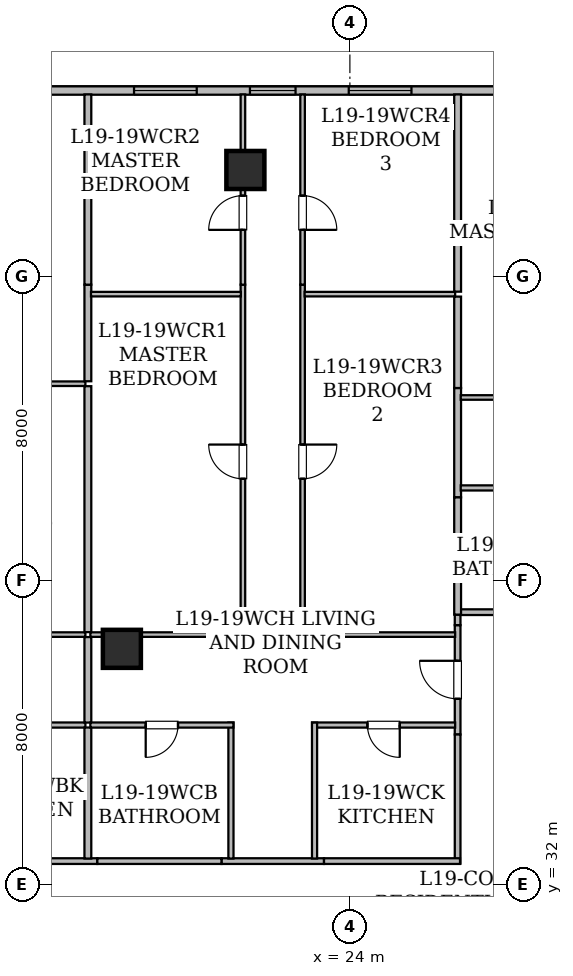
"""IFC4 building model, lengths in metres.
Left out: names, types, materials, properties, quantities, classifications, styles, units other than length and angle.
Written with IfcOpenShell. Run it as: python <this file> out.ifc"""

import sys

from ifc_helpers import new_model, si_unit, direction, frame, frame_2d, origin, origin_2d, place, context, subcontext, project, spatial, rectangle, hollow_rectangle, extrude, element, fill, save


model = new_model("IFC4")
c1 = context("Model", 3, precision=1e-05, world=origin(), true_north=direction((0.0, 1.0)))
c2 = subcontext(c1, "Body", "Model", "MODEL_VIEW")
j1 = project(units=[si_unit("LENGTHUNIT", "METRE"), si_unit("PLANEANGLEUNIT", "RADIAN")], contexts=[c1])
p1 = place(None, origin())
s1 = spatial("IfcSite", under=j1, at=p1, CompositionType="ELEMENT")
p2 = place(p1, origin())
s2 = spatial("IfcBuilding", under=s1, at=p2, CompositionType="ELEMENT")
p3 = place(p2, frame((0.0, 0.0, 77.1)))
s3 = spatial("IfcBuildingStorey", under=s2, at=p3, CompositionType="ELEMENT", Elevation=77.1)
for number, where, z_axis, x_axis in (
    (1, (21.25, 50.8, 0.0), (0.0, 0.0, 1.0), (1.0, 0.0, 0.0)),
    (2, (18.0, 38.2, 0.0), (0.0, 0.0, 1.0), (1.0, 0.0, 0.0)),
):
    element("IfcColumn", number, at=place(p3, frame(where, z_axis=z_axis, x_axis=x_axis)), inside=s3, PredefinedType="COLUMN", context=c2, shape_type="SweptSolid", body=[
        extrude(hollow_rectangle(XDim=1.0, YDim=1.0, WallThickness=0.05, at=origin_2d()), origin(), (0.0, 0.0, 1.0), 3.65),
    ])
p4 = place(p3, frame((8.315, 52.89, 0.0), z_axis=(0.0, 0.0, 1.0), x_axis=(1.0, 0.0, 0.0)))
e3 = element("IfcWall", 3, at=p4, inside=s3, PredefinedType="STANDARD", context=c2, shape_type="SweptSolid", body=[
    extrude(rectangle(XDim=37.439, YDim=0.22, at=frame_2d((18.719, 0.0))), origin(), (0.0, 0.0, 1.0), 3.43),
])
p5 = place(p4, frame((5.093, 0.0, 0.85)))
e4 = element("IfcOpeningElement", 4, at=p5, cuts=e3, PredefinedType="OPENING", context=c2, shape_type="SweptSolid", body=[
    extrude(rectangle(XDim=1.65, YDim=1.55, at=frame_2d((0.825, 0.775))), frame((0.0, 0.12, 0.0), z_axis=(0.0, -1.0, 0.0), x_axis=(1.0, 0.0, 0.0)), (0.0, 0.0, 1.0), 0.24),
])
p6 = place(p4, frame((13.055, 0.0, 0.8)))
e5 = element("IfcOpeningElement", 5, at=p6, cuts=e3, PredefinedType="OPENING", context=c2, shape_type="SweptSolid", body=[
    extrude(rectangle(XDim=1.2, YDim=1.5, at=frame_2d((0.6, 0.75))), frame((0.0, 0.12, 0.0), z_axis=(0.0, -1.0, 0.0), x_axis=(1.0, 0.0, 0.0)), (0.0, 0.0, 1.0), 0.24),
])
p7 = place(p4, frame((10.005, 0.0, 0.85)))
e6 = element("IfcOpeningElement", 6, at=p7, cuts=e3, PredefinedType="OPENING", context=c2, shape_type="SweptSolid", body=[
    extrude(rectangle(XDim=1.65, YDim=1.55, at=frame_2d((0.825, 0.775))), frame((0.0, 0.12, 0.0), z_axis=(0.0, -1.0, 0.0), x_axis=(1.0, 0.0, 0.0)), (0.0, 0.0, 1.0), 0.24),
])
p8 = place(p4, frame((15.655, 0.0, 0.85)))
e7 = element("IfcOpeningElement", 7, at=p8, cuts=e3, PredefinedType="OPENING", context=c2, shape_type="SweptSolid", body=[
    extrude(rectangle(XDim=1.65, YDim=1.55, at=frame_2d((0.825, 0.775))), frame((0.0, 0.12, 0.0), z_axis=(0.0, -1.0, 0.0), x_axis=(1.0, 0.0, 0.0)), (0.0, 0.0, 1.0), 0.24),
])
p9 = place(p4, frame((25.185, 0.0, 0.8)))
e8 = element("IfcOpeningElement", 8, at=p9, cuts=e3, PredefinedType="OPENING", context=c2, shape_type="SweptSolid", body=[
    extrude(rectangle(XDim=1.2, YDim=1.5, at=frame_2d((0.6, 0.75))), frame((0.0, 0.12, 0.0), z_axis=(0.0, -1.0, 0.0), x_axis=(1.0, 0.0, 0.0)), (0.0, 0.0, 1.0), 0.24),
])
p10 = place(p4, frame((20.935, 0.0, 0.85)))
e9 = element("IfcOpeningElement", 9, at=p10, cuts=e3, PredefinedType="OPENING", context=c2, shape_type="SweptSolid", body=[
    extrude(rectangle(XDim=1.65, YDim=1.55, at=frame_2d((0.825, 0.775))), frame((0.0, 0.12, 0.0), z_axis=(0.0, -1.0, 0.0), x_axis=(1.0, 0.0, 0.0)), (0.0, 0.0, 1.0), 0.24),
])
p11 = place(p4, frame((28.985, 0.0, 0.85)))
e10 = element("IfcOpeningElement", 10, at=p11, cuts=e3, PredefinedType="OPENING", context=c2, shape_type="SweptSolid", body=[
    extrude(rectangle(XDim=1.65, YDim=1.55, at=frame_2d((0.825, 0.775))), frame((0.0, 0.12, 0.0), z_axis=(0.0, -1.0, 0.0), x_axis=(1.0, 0.0, 0.0)), (0.0, 0.0, 1.0), 0.24),
])
p12 = place(p4, frame((33.98, 0.0, 0.85)))
e11 = element("IfcOpeningElement", 11, at=p12, cuts=e3, PredefinedType="OPENING", context=c2, shape_type="SweptSolid", body=[
    extrude(rectangle(XDim=1.65, YDim=1.55, at=frame_2d((0.825, 0.775))), frame((0.0, 0.12, 0.0), z_axis=(0.0, -1.0, 0.0), x_axis=(1.0, 0.0, 0.0)), (0.0, 0.0, 1.0), 0.24),
])
p13 = place(p3, frame((11.924, 32.615, 0.0), z_axis=(0.0, 0.0, 1.0), x_axis=(1.0, 0.0, 0.0)))
e12 = element("IfcWall", 12, at=p13, inside=s3, PredefinedType="STANDARD", context=c2, shape_type="SweptSolid", body=[
    extrude(rectangle(XDim=5.43, YDim=0.15, at=frame_2d((2.715, 0.0))), origin(), (0.0, 0.0, 1.0), 3.43),
])
p14 = place(p3, frame((26.835, 35.946, 0.0), z_axis=(0.0, 0.0, 1.0), x_axis=(0.0, 1.0, 0.0)))
e13 = element("IfcWall", 13, at=p14, inside=s3, PredefinedType="STANDARD", context=c2, shape_type="SweptSolid", body=[
    extrude(rectangle(XDim=2.878, YDim=0.15, at=frame_2d((1.439, 0.0))), origin(), (0.0, 0.0, 1.0), 2.647),
])
p15 = place(p14, frame((0.939, 0.0, 0.0)))
e14 = element("IfcOpeningElement", 14, at=p15, cuts=e13, PredefinedType="OPENING", context=c2, shape_type="SweptSolid", body=[
    extrude(rectangle(XDim=1.0, YDim=2.15, at=frame_2d((0.5, 1.075))), frame((0.0, 0.085, 0.0), z_axis=(0.0, -1.0, 0.0), x_axis=(1.0, 0.0, 0.0)), (0.0, 0.0, 1.0), 0.17),
])
p16 = place(p3, frame((20.621, 32.615, 0.0), z_axis=(0.0, 0.0, 1.0), x_axis=(1.0, 0.0, 0.0)))
e15 = element("IfcWall", 15, at=p16, inside=s3, PredefinedType="STANDARD", context=c2, shape_type="SweptSolid", body=[
    extrude(rectangle(XDim=2.698, YDim=0.15, at=frame_2d((1.349, 0.0))), origin(), (0.0, 0.0, 1.0), 3.43),
])
p17 = place(p3, frame((17.354, 32.615, 0.0), z_axis=(0.0, 0.0, 1.0), x_axis=(1.0, 0.0, 0.0)))
e16 = element("IfcWall", 16, at=p17, inside=s3, PredefinedType="STANDARD", context=c2, shape_type="SweptSolid", body=[
    extrude(rectangle(XDim=3.267, YDim=0.15, at=frame_2d((1.634, 0.0))), origin(), (0.0, 0.0, 1.0), 2.647),
])
p18 = place(p3, frame((26.835, 32.55, 0.0), z_axis=(0.0, 0.0, 1.0), x_axis=(0.0, 1.0, 0.0)))
e17 = element("IfcWall", 17, at=p18, inside=s3, PredefinedType="STANDARD", context=c2, shape_type="SweptSolid", body=[
    extrude(rectangle(XDim=3.396, YDim=0.15, at=frame_2d((1.698, 0.0))), origin(), (0.0, 0.0, 1.0), 3.43),
])
p19 = place(p3, frame((23.319, 32.615, 0.0), z_axis=(0.0, 0.0, 1.0), x_axis=(1.0, 0.0, 0.0)))
e18 = element("IfcWall", 18, at=p19, inside=s3, PredefinedType="STANDARD", context=c2, shape_type="SweptSolid", body=[
    extrude(rectangle(XDim=3.579, YDim=0.15, at=frame_2d((1.79, 0.0))), origin(), (0.0, 0.0, 1.0), 3.43),
])
p20 = place(p3, frame((26.835, 38.824, 0.0), z_axis=(0.0, 0.0, 1.0), x_axis=(0.0, 1.0, 0.0)))
e19 = element("IfcWall", 19, at=p20, inside=s3, PredefinedType="STANDARD", context=c2, shape_type="SweptSolid", body=[
    extrude(rectangle(XDim=0.276, YDim=0.15, at=frame_2d((0.138, 0.0))), origin(), (0.0, 0.0, 1.0), 3.43),
])
p21 = place(p3, frame((26.9, 39.165, 0.0), z_axis=(0.0, 0.0, 1.0), x_axis=(1.0, 0.0, 0.0)))
e20 = element("IfcWall", 20, at=p21, inside=s3, PredefinedType="STANDARD", context=c2, shape_type="SweptSolid", body=[
    extrude(rectangle(XDim=4.701, YDim=0.15, at=frame_2d((2.351, 0.0))), origin(), (0.0, 0.0, 1.0), 2.647),
])
p22 = place(p3, frame((17.04, 36.195, 0.0), z_axis=(0.0, 0.0, 1.0), x_axis=(-1.0, 0.0, 0.0)))
e21 = element("IfcWall", 21, at=p22, inside=s3, PredefinedType="PARTITIONING", context=c2, shape_type="SweptSolid", body=[
    extrude(rectangle(XDim=5.43, YDim=0.135, at=frame_2d((2.715, 0.0))), origin(), (0.0, 0.0, 1.0), 3.43),
])
p23 = place(p22, frame((2.29, 0.0, 0.0)))
e22 = element("IfcOpeningElement", 22, at=p23, cuts=e21, PredefinedType="OPENING", context=c2, shape_type="SweptSolid", body=[
    extrude(rectangle(XDim=0.85, YDim=2.1, at=frame_2d((0.425, 1.05))), frame((0.0, 0.077, 0.0), z_axis=(0.0, -1.0, 0.0), x_axis=(1.0, 0.0, 0.0)), (0.0, 0.0, 1.0), 0.155),
])
p24 = place(p3, frame((11.295, 38.575, 0.0), z_axis=(0.0, 0.0, 1.0), x_axis=(1.0, 0.0, 0.0)))
e23 = element("IfcWall", 23, at=p24, inside=s3, PredefinedType="PARTITIONING", context=c2, shape_type="SweptSolid", body=[
    extrude(rectangle(XDim=5.745, YDim=0.12, at=frame_2d((2.873, 0.0))), origin(), (0.0, 0.0, 1.0), 2.647),
])
p25 = place(p3, frame((17.105, 38.51, 0.0), z_axis=(0.0, 0.0, 1.0), x_axis=(0.0, -1.0, 0.0)))
e24 = element("IfcWall", 24, at=p25, inside=s3, PredefinedType="STANDARD", context=c2, shape_type="SweptSolid", body=[
    extrude(rectangle(XDim=2.25, YDim=0.18, at=frame_2d((1.125, 0.0))), origin(), (0.0, 0.0, 1.0), 2.647),
])
p26 = place(p3, frame((17.105, 36.13, 0.0), z_axis=(0.0, 0.0, 1.0), x_axis=(0.0, -1.0, 0.0)))
e25 = element("IfcWall", 25, at=p26, inside=s3, PredefinedType="STANDARD", context=c2, shape_type="SweptSolid", body=[
    extrude(rectangle(XDim=3.448, YDim=0.18, at=frame_2d((1.724, 0.0))), origin(), (0.0, 0.0, 1.0), 3.43),
])
p27 = place(p3, frame((11.414, 45.176, 0.0), z_axis=(0.0, 0.0, 1.0), x_axis=(1.0, 0.0, 0.0)))
e26 = element("IfcWall", 26, at=p27, inside=s3, PredefinedType="PARTITIONING", context=c2, shape_type="SweptSolid", body=[
    extrude(rectangle(XDim=5.626, YDim=0.12, at=frame_2d((2.813, 0.0))), origin(), (0.0, 0.0, 1.0), 2.647),
])
p28 = place(p3, frame((17.105, 45.111, 0.0), z_axis=(0.0, 0.0, 1.0), x_axis=(0.0, -1.0, 0.0)))
e27 = element("IfcWall", 27, at=p28, inside=s3, PredefinedType="STANDARD", context=c2, shape_type="SweptSolid", body=[
    extrude(rectangle(XDim=6.471, YDim=0.18, at=frame_2d((3.236, 0.0))), origin(), (0.0, 0.0, 1.0), 2.647),
])
p29 = place(p3, frame((17.105, 47.782, 0.0), z_axis=(0.0, 0.0, 1.0), x_axis=(0.0, -1.0, 0.0)))
e28 = element("IfcWall", 28, at=p29, inside=s3, PredefinedType="STANDARD", context=c2, shape_type="SweptSolid", body=[
    extrude(rectangle(XDim=2.541, YDim=0.18, at=frame_2d((1.271, 0.0))), origin(), (0.0, 0.0, 1.0), 3.43),
])
p30 = place(p3, frame((17.105, 52.788, 0.0), z_axis=(0.0, 0.0, 1.0), x_axis=(0.0, -1.0, 0.0)))
e29 = element("IfcWall", 29, at=p30, inside=s3, PredefinedType="STANDARD", context=c2, shape_type="SweptSolid", body=[
    extrude(rectangle(XDim=5.006, YDim=0.18, at=frame_2d((2.503, 0.0))), origin(), (0.0, 0.0, 1.0), 2.803),
])
p31 = place(p3, frame((20.87, 32.682, 0.0), z_axis=(0.0, 0.0, 1.0), x_axis=(0.0, 1.0, 0.0)))
e30 = element("IfcWall", 30, at=p31, inside=s3, PredefinedType="PARTITIONING", context=c2, shape_type="SweptSolid", body=[
    extrude(rectangle(XDim=3.578, YDim=0.135, at=frame_2d((1.789, 0.0))), origin(), (0.0, 0.0, 1.0), 3.43),
])
p32 = place(p3, frame((20.935, 36.195, 0.0), z_axis=(0.0, 0.0, 1.0), x_axis=(-1.0, 0.0, 0.0)))
e31 = element("IfcWall", 31, at=p32, inside=s3, PredefinedType="PARTITIONING", context=c2, shape_type="SweptSolid", body=[
    extrude(rectangle(XDim=3.765, YDim=0.135, at=frame_2d((1.883, 0.0))), origin(), (0.0, 0.0, 1.0), 2.647),
])
p33 = place(p32, frame((1.458, 0.0, 0.0)))
e32 = element("IfcOpeningElement", 32, at=p33, cuts=e31, PredefinedType="OPENING", context=c2, shape_type="SweptSolid", body=[
    extrude(rectangle(XDim=0.85, YDim=2.1, at=frame_2d((0.425, 1.05))), frame((0.0, 0.077, 0.0), z_axis=(0.0, -1.0, 0.0), x_axis=(1.0, 0.0, 0.0)), (0.0, 0.0, 1.0), 0.155),
])
p34 = place(p3, frame((26.77, 36.195, 0.0), z_axis=(0.0, 0.0, 1.0), x_axis=(-1.0, 0.0, 0.0)))
e33 = element("IfcWall", 33, at=p34, inside=s3, PredefinedType="PARTITIONING", context=c2, shape_type="SweptSolid", body=[
    extrude(rectangle(XDim=3.765, YDim=0.135, at=frame_2d((1.883, 0.0))), origin(), (0.0, 0.0, 1.0), 3.43),
])
p35 = place(p34, frame((1.458, 0.0, 0.0)))
e34 = element("IfcOpeningElement", 34, at=p35, cuts=e33, PredefinedType="OPENING", context=c2, shape_type="SweptSolid", body=[
    extrude(rectangle(XDim=0.85, YDim=2.1, at=frame_2d((0.425, 1.05))), frame((0.0, 0.077, 0.0), z_axis=(0.0, -1.0, 0.0), x_axis=(1.0, 0.0, 0.0)), (0.0, 0.0, 1.0), 0.155),
])
p36 = place(p3, frame((23.07, 36.26, 0.0), z_axis=(0.0, 0.0, 1.0), x_axis=(0.0, -1.0, 0.0)))
e35 = element("IfcWall", 35, at=p36, inside=s3, PredefinedType="PARTITIONING", context=c2, shape_type="SweptSolid", body=[
    extrude(rectangle(XDim=3.578, YDim=0.135, at=frame_2d((1.789, 0.0))), origin(), (0.0, 0.0, 1.0), 3.43),
])
p37 = place(p3, frame((17.17, 38.575, 0.0), z_axis=(0.0, 0.0, 1.0), x_axis=(1.0, 0.0, 0.0)))
e36 = element("IfcWall", 36, at=p37, inside=s3, PredefinedType="PARTITIONING", context=c2, shape_type="SweptSolid", body=[
    extrude(rectangle(XDim=4.08, YDim=0.12, at=frame_2d((2.04, 0.0))), origin(), (0.0, 0.0, 1.0), 2.647),
])
p38 = place(p3, frame((21.185, 38.51, 0.0), z_axis=(0.0, 0.0, 1.0), x_axis=(0.0, 1.0, 0.0)))
e37 = element("IfcWall", 37, at=p38, inside=s3, PredefinedType="PARTITIONING", context=c2, shape_type="SweptSolid", body=[
    extrude(rectangle(XDim=9.272, YDim=0.12, at=frame_2d((4.636, 0.0))), origin(), (0.0, 0.0, 1.0), 2.961),
])
p39 = place(p38, frame((4.165, 0.0, 0.0)))
e38 = element("IfcOpeningElement", 38, at=p39, cuts=e37, PredefinedType="OPENING", context=c2, shape_type="SweptSolid", body=[
    extrude(rectangle(XDim=0.9, YDim=2.1, at=frame_2d((0.45, 1.05))), frame((0.0, 0.07, 0.0), z_axis=(0.0, -1.0, 0.0), x_axis=(1.0, 0.0, 0.0)), (0.0, 0.0, 1.0), 0.14),
])
p40 = place(p3, frame((21.185, 47.782, 0.0), z_axis=(0.0, 0.0, 1.0), x_axis=(0.0, 1.0, 0.0)))
e39 = element("IfcWall", 39, at=p40, inside=s3, PredefinedType="PARTITIONING", context=c2, shape_type="SweptSolid", body=[
    extrude(rectangle(XDim=5.006, YDim=0.12, at=frame_2d((2.503, 0.0))), origin(), (0.0, 0.0, 1.0), 2.647),
])
p41 = place(p40, frame((1.442, 0.0, 0.0)))
e40 = element("IfcOpeningElement", 40, at=p41, cuts=e39, PredefinedType="OPENING", context=c2, shape_type="SweptSolid", body=[
    extrude(rectangle(XDim=0.9, YDim=2.1, at=frame_2d((0.45, 1.05))), frame((0.0, 0.07, 0.0), z_axis=(0.0, -1.0, 0.0), x_axis=(1.0, 0.0, 0.0)), (0.0, 0.0, 1.0), 0.14),
])
p42 = place(p3, frame((22.755, 47.782, 0.0), z_axis=(0.0, 0.0, 1.0), x_axis=(0.0, -1.0, 0.0)))
e41 = element("IfcWall", 41, at=p42, inside=s3, PredefinedType="PARTITIONING", context=c2, shape_type="SweptSolid", body=[
    extrude(rectangle(XDim=9.272, YDim=0.12, at=frame_2d((4.636, 0.0))), origin(), (0.0, 0.0, 1.0), 2.961),
])
p43 = place(p42, frame((4.207, 0.0, 0.0)))
e42 = element("IfcOpeningElement", 42, at=p43, cuts=e41, PredefinedType="OPENING", context=c2, shape_type="SweptSolid", body=[
    extrude(rectangle(XDim=0.9, YDim=2.1, at=frame_2d((0.45, 1.05))), frame((0.0, 0.07, 0.0), z_axis=(0.0, -1.0, 0.0), x_axis=(1.0, 0.0, 0.0)), (0.0, 0.0, 1.0), 0.14),
])
p44 = place(p3, frame((22.69, 38.575, 0.0), z_axis=(0.0, 0.0, 1.0), x_axis=(1.0, 0.0, 0.0)))
e43 = element("IfcWall", 43, at=p44, inside=s3, PredefinedType="PARTITIONING", context=c2, shape_type="SweptSolid", body=[
    extrude(rectangle(XDim=4.08, YDim=0.12, at=frame_2d((2.04, 0.0))), origin(), (0.0, 0.0, 1.0), 3.43),
])
p45 = place(p3, frame((22.755, 52.788, 0.0), z_axis=(0.0, 0.0, 1.0), x_axis=(0.0, -1.0, 0.0)))
e44 = element("IfcWall", 44, at=p45, inside=s3, PredefinedType="PARTITIONING", context=c2, shape_type="SweptSolid", body=[
    extrude(rectangle(XDim=5.006, YDim=0.12, at=frame_2d((2.503, 0.0))), origin(), (0.0, 0.0, 1.0), 2.803),
])
p46 = place(p45, frame((2.664, 0.0, 0.0)))
e45 = element("IfcOpeningElement", 45, at=p46, cuts=e44, PredefinedType="OPENING", context=c2, shape_type="SweptSolid", body=[
    extrude(rectangle(XDim=0.9, YDim=2.1, at=frame_2d((0.45, 1.05))), frame((0.0, 0.07, 0.0), z_axis=(0.0, -1.0, 0.0), x_axis=(1.0, 0.0, 0.0)), (0.0, 0.0, 1.0), 0.14),
])
p47 = place(p3, frame((17.187, 47.533, 0.0), z_axis=(0.0, 0.0, 1.0), x_axis=(1.0, 0.0, 0.0)))
e46 = element("IfcWall", 46, at=p47, inside=s3, PredefinedType="PARTITIONING", context=c2, shape_type="SweptSolid", body=[
    extrude(rectangle(XDim=3.944, YDim=0.12, at=frame_2d((1.972, 0.0))), origin(), (0.0, 0.0, 1.0), 2.647),
])
p48 = place(p3, frame((22.809, 47.533, 0.0), z_axis=(0.0, 0.0, 1.0), x_axis=(1.0, 0.0, 0.0)))
e47 = element("IfcWall", 47, at=p48, inside=s3, PredefinedType="PARTITIONING", context=c2, shape_type="SweptSolid", body=[
    extrude(rectangle(XDim=3.961, YDim=0.12, at=frame_2d((1.98, 0.0))), origin(), (0.0, 0.0, 1.0), 3.43),
])
p49 = place(p3, frame((26.835, 45.063, 0.0), z_axis=(0.0, 0.0, 1.0), x_axis=(0.0, -1.0, 0.0)))
e48 = element("IfcWall", 48, at=p49, inside=s3, PredefinedType="STANDARD", context=c2, shape_type="SweptSolid", body=[
    extrude(rectangle(XDim=2.878, YDim=0.18, at=frame_2d((1.439, 0.0))), origin(), (0.0, 0.0, 1.0), 2.961),
])
p50 = place(p3, frame((26.835, 42.185, 0.0), z_axis=(0.0, 0.0, 1.0), x_axis=(0.0, -1.0, 0.0)))
e49 = element("IfcWall", 49, at=p50, inside=s3, PredefinedType="STANDARD", context=c2, shape_type="SweptSolid", body=[
    extrude(rectangle(XDim=3.085, YDim=0.18, at=frame_2d((1.542, 0.0))), origin(), (0.0, 0.0, 1.0), 3.43),
])
p51 = place(p3, frame((26.835, 47.468, 0.0), z_axis=(0.0, 0.0, 1.0), x_axis=(0.0, -1.0, 0.0)))
e50 = element("IfcWall", 50, at=p51, inside=s3, PredefinedType="STANDARD", context=c2, shape_type="SweptSolid", body=[
    extrude(rectangle(XDim=2.405, YDim=0.18, at=frame_2d((1.203, 0.0))), origin(), (0.0, 0.0, 1.0), 3.43),
])
p52 = place(p3, frame((26.835, 52.788, 0.0), z_axis=(0.0, 0.0, 1.0), x_axis=(0.0, -1.0, 0.0)))
e51 = element("IfcWall", 51, at=p52, inside=s3, PredefinedType="STANDARD", context=c2, shape_type="SweptSolid", body=[
    extrude(rectangle(XDim=5.19, YDim=0.18, at=frame_2d((2.595, 0.0))), origin(), (0.0, 0.0, 1.0), 2.803),
])
p53 = place(p3, frame((31.915, 42.434, 0.0), z_axis=(0.0, 0.0, 1.0), x_axis=(-1.0, 0.0, 0.0)))
e52 = element("IfcWall", 52, at=p53, inside=s3, PredefinedType="PARTITIONING", context=c2, shape_type="SweptSolid", body=[
    extrude(rectangle(XDim=4.998, YDim=0.135, at=frame_2d((2.499, 0.0))), origin(), (0.0, 0.0, 1.0), 2.647),
])
p54 = place(p53, frame((2.074, 0.0, 0.0)))
e53 = element("IfcOpeningElement", 53, at=p54, cuts=e52, PredefinedType="OPENING", context=c2, shape_type="SweptSolid", body=[
    extrude(rectangle(XDim=0.85, YDim=2.1, at=frame_2d((0.425, 1.05))), frame((0.0, 0.077, 0.0), z_axis=(0.0, -1.0, 0.0), x_axis=(1.0, 0.0, 0.0)), (0.0, 0.0, 1.0), 0.155),
])
p55 = place(p3, frame((26.917, 44.814, 0.0), z_axis=(0.0, 0.0, 1.0), x_axis=(1.0, 0.0, 0.0)))
e54 = element("IfcWall", 54, at=p55, inside=s3, PredefinedType="PARTITIONING", context=c2, shape_type="SweptSolid", body=[
    extrude(rectangle(XDim=6.463, YDim=0.12, at=frame_2d((3.231, 0.0))), origin(), (0.0, 0.0, 1.0), 2.647),
])
p56 = place(p6, origin())
e55 = element("IfcWindow", 55, at=p56, inside=s3, PartitioningType="SINGLE_PANEL", PredefinedType="WINDOW", context=c2, shape_type="SweptSolid", body=[
    extrude(rectangle(XDim=1.2, YDim=1.5, at=frame_2d((0.6, 0.75))), frame((0.0, 0.03, 0.0), z_axis=(0.0, -1.0, 0.0), x_axis=(1.0, 0.0, 0.0)), (0.0, 0.0, 1.0), 0.06),
])
fill(e5, e55)
p57 = place(p7, origin())
e56 = element("IfcWindow", 56, at=p57, inside=s3, PartitioningType="SINGLE_PANEL", PredefinedType="WINDOW", context=c2, shape_type="SweptSolid", body=[
    extrude(rectangle(XDim=1.65, YDim=1.55, at=frame_2d((0.825, 0.775))), frame((0.0, 0.03, 0.0), z_axis=(0.0, -1.0, 0.0), x_axis=(1.0, 0.0, 0.0)), (0.0, 0.0, 1.0), 0.06),
])
fill(e6, e56)
p58 = place(p8, origin())
e57 = element("IfcWindow", 57, at=p58, inside=s3, PartitioningType="SINGLE_PANEL", PredefinedType="WINDOW", context=c2, shape_type="SweptSolid", body=[
    extrude(rectangle(XDim=1.65, YDim=1.55, at=frame_2d((0.825, 0.775))), frame((0.0, 0.03, 0.0), z_axis=(0.0, -1.0, 0.0), x_axis=(1.0, 0.0, 0.0)), (0.0, 0.0, 1.0), 0.06),
])
fill(e7, e57)
p59 = place(p15, origin())
e58 = element("IfcDoor", 58, at=p59, inside=s3, OperationType="SINGLE_SWING_RIGHT", PredefinedType="DOOR", context=c2, shape_type="SweptSolid", body=[
    extrude(rectangle(XDim=1.0, YDim=2.15, at=frame_2d((0.5, 1.075))), frame((0.0, 0.025, 0.0), z_axis=(0.0, -1.0, 0.0), x_axis=(1.0, 0.0, 0.0)), (0.0, 0.0, 1.0), 0.05),
])
fill(e14, e58)
p60 = place(p33, origin())
e59 = element("IfcDoor", 59, at=p60, inside=s3, OperationType="SINGLE_SWING_RIGHT", PredefinedType="DOOR", context=c2, shape_type="SweptSolid", body=[
    extrude(rectangle(XDim=0.85, YDim=2.1, at=frame_2d((0.425, 1.05))), frame((0.0, 0.025, 0.0), z_axis=(0.0, -1.0, 0.0), x_axis=(1.0, 0.0, 0.0)), (0.0, 0.0, 1.0), 0.05),
])
fill(e32, e59)
p61 = place(p35, origin())
e60 = element("IfcDoor", 60, at=p61, inside=s3, OperationType="SINGLE_SWING_LEFT", PredefinedType="DOOR", context=c2, shape_type="SweptSolid", body=[
    extrude(rectangle(XDim=0.85, YDim=2.1, at=frame_2d((0.425, 1.05))), frame((0.0, 0.025, 0.0), z_axis=(0.0, -1.0, 0.0), x_axis=(1.0, 0.0, 0.0)), (0.0, 0.0, 1.0), 0.05),
])
fill(e34, e60)
p62 = place(p39, origin())
e61 = element("IfcDoor", 61, at=p62, inside=s3, OperationType="SINGLE_SWING_RIGHT", PredefinedType="DOOR", context=c2, shape_type="SweptSolid", body=[
    extrude(rectangle(XDim=0.9, YDim=2.1, at=frame_2d((0.45, 1.05))), frame((0.0, 0.025, 0.0), z_axis=(0.0, -1.0, 0.0), x_axis=(1.0, 0.0, 0.0)), (0.0, 0.0, 1.0), 0.05),
])
fill(e38, e61)
p63 = place(p41, origin())
e62 = element("IfcDoor", 62, at=p63, inside=s3, OperationType="SINGLE_SWING_LEFT", PredefinedType="DOOR", context=c2, shape_type="SweptSolid", body=[
    extrude(rectangle(XDim=0.9, YDim=2.1, at=frame_2d((0.45, 1.05))), frame((0.0, 0.025, 0.0), z_axis=(0.0, -1.0, 0.0), x_axis=(1.0, 0.0, 0.0)), (0.0, 0.0, 1.0), 0.05),
])
fill(e40, e62)
p64 = place(p43, origin())
e63 = element("IfcDoor", 63, at=p64, inside=s3, OperationType="SINGLE_SWING_LEFT", PredefinedType="DOOR", context=c2, shape_type="SweptSolid", body=[
    extrude(rectangle(XDim=0.9, YDim=2.1, at=frame_2d((0.45, 1.05))), frame((0.0, 0.025, 0.0), z_axis=(0.0, -1.0, 0.0), x_axis=(1.0, 0.0, 0.0)), (0.0, 0.0, 1.0), 0.05),
])
fill(e42, e63)
p65 = place(p46, origin())
e64 = element("IfcDoor", 64, at=p65, inside=s3, OperationType="SINGLE_SWING_RIGHT", PredefinedType="DOOR", context=c2, shape_type="SweptSolid", body=[
    extrude(rectangle(XDim=0.9, YDim=2.1, at=frame_2d((0.45, 1.05))), frame((0.0, 0.025, 0.0), z_axis=(0.0, -1.0, 0.0), x_axis=(1.0, 0.0, 0.0)), (0.0, 0.0, 1.0), 0.05),
])
fill(e45, e64)
save(model, sys.argv[1])
